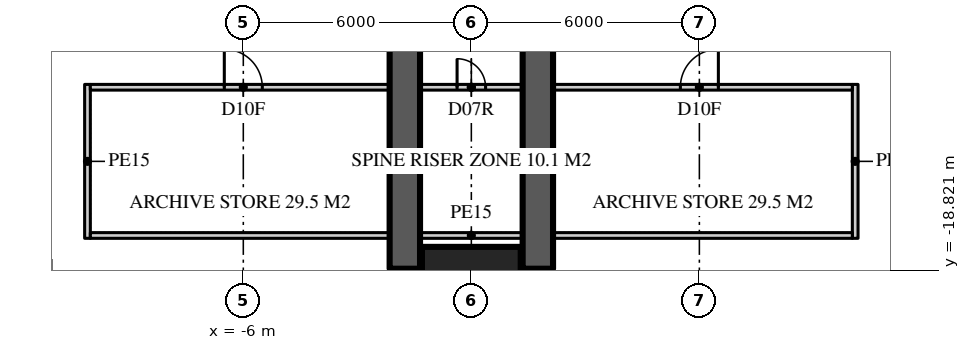
"""IFC4 building model, lengths in metres.
Left out: names, types, materials, properties, quantities, classifications, styles, units other than length and angle.
Written with IfcOpenShell. Run it as: python <this file> out.ifc"""

import sys

from ifc_helpers import new_model, si_unit, direction, frame, frame_2d, origin, origin_2d, place, context, subcontext, project, spatial, rectangle, extrude, element, fill, save


model = new_model("IFC4")
c1 = context("Model", 3, precision=1e-05, world=origin(), true_north=direction((0.0, 1.0)))
c2 = subcontext(c1, "Body", "Model", "MODEL_VIEW")
j1 = project(units=[si_unit("LENGTHUNIT", "METRE"), si_unit("PLANEANGLEUNIT", "RADIAN")], contexts=[c1])
p1 = place(None, origin())
s1 = spatial("IfcSite", under=j1, at=p1, CompositionType="ELEMENT")
p2 = place(p1, origin())
s2 = spatial("IfcBuilding", under=s1, at=p2, CompositionType="ELEMENT")
p3 = place(p2, frame((0.0, 0.0, -5.0)))
s3 = spatial("IfcBuildingStorey", under=s2, at=p3, CompositionType="ELEMENT", Elevation=-5.0)
for number, where, z_axis, x_axis in (
    (1, (-1.75, -11.15, 0.0), (0.0, 0.0, 1.0), (0.0, -1.0, 0.0)),
    (2, (1.75, -11.15, 0.0), (0.0, 0.0, 1.0), (0.0, -1.0, 0.0)),
):
    element("IfcWall", number, at=place(p3, frame(where, z_axis=z_axis, x_axis=x_axis)), inside=s3, PredefinedType="SHEAR", context=c2, shape_type="SweptSolid", body=[
        extrude(rectangle(XDim=7.625, YDim=0.8, at=frame_2d((3.812, 0.0))), origin(), (0.0, 0.0, 1.0), 5.0),
    ])
p4 = place(p3, frame((0.0, -19.5, 0.0), z_axis=(0.0, 0.0, 1.0), x_axis=(1.0, 0.0, 0.0)))
e3 = element("IfcColumn", 3, at=p4, inside=s3, PredefinedType="COLUMN", context=c2, shape_type="SweptSolid", body=[
    extrude(rectangle(XDim=2.6, YDim=2.6, at=origin_2d()), origin(), (0.0, 0.0, 1.0), 5.0),
])
for number, where, z_axis, x_axis in (
    (4, (-10.1, -13.925, 0.0), (0.0, 0.0, 1.0), (0.0, -1.0, 0.0)),
    (5, (10.1, -13.925, 0.0), (0.0, 0.0, 1.0), (0.0, -1.0, 0.0)),
):
    element("IfcWall", number, at=place(p3, frame(where, z_axis=z_axis, x_axis=x_axis)), inside=s3, PredefinedType="SOLIDWALL", context=c2, shape_type="SweptSolid", body=[
        extrude(rectangle(XDim=4.05, YDim=0.15, at=frame_2d((2.025, 0.0))), origin(), (0.0, 0.0, 1.0), 4.6),
    ])
p5 = place(p3, frame((-10.025, -17.9, 0.0), z_axis=(0.0, 0.0, 1.0), x_axis=(1.0, 0.0, 0.0)))
e6 = element("IfcWall", 6, at=p5, inside=s3, PredefinedType="SOLIDWALL", context=c2, shape_type="SweptSolid", body=[
    extrude(rectangle(XDim=20.05, YDim=0.15, at=frame_2d((10.025, 0.0))), origin(), (0.0, 0.0, 1.0), 4.6),
])
p6 = place(p3, frame((-10.025, -14.0, 0.0), z_axis=(0.0, 0.0, 1.0), x_axis=(1.0, 0.0, 0.0)))
e7 = element("IfcWall", 7, at=p6, inside=s3, PredefinedType="SOLIDWALL", context=c2, shape_type="SweptSolid", body=[
    extrude(rectangle(XDim=20.05, YDim=0.15, at=frame_2d((10.025, 0.0))), origin(), (0.0, 0.0, 1.0), 4.6),
])
p7 = place(p6, frame((9.65, 0.0, 0.0)))
e8 = element("IfcOpeningElement", 8, at=p7, cuts=e7, PredefinedType="OPENING", context=c2, shape_type="SweptSolid", body=[
    extrude(rectangle(XDim=0.75, YDim=2.1, at=frame_2d((0.375, 1.05))), frame((0.0, 0.085, 0.0), z_axis=(0.0, -1.0, 0.0), x_axis=(1.0, 0.0, 0.0)), (0.0, 0.0, 1.0), 0.17),
])
p8 = place(p6, frame((3.525, 0.0, 0.0)))
e9 = element("IfcOpeningElement", 9, at=p8, cuts=e7, PredefinedType="OPENING", context=c2, shape_type="SweptSolid", body=[
    extrude(rectangle(XDim=1.0, YDim=2.2, at=frame_2d((0.5, 1.1))), frame((0.0, 0.085, 0.0), z_axis=(0.0, -1.0, 0.0), x_axis=(1.0, 0.0, 0.0)), (0.0, 0.0, 1.0), 0.17),
])
p9 = place(p6, frame((15.525, 0.0, 0.0)))
e10 = element("IfcOpeningElement", 10, at=p9, cuts=e7, PredefinedType="OPENING", context=c2, shape_type="SweptSolid", body=[
    extrude(rectangle(XDim=1.0, YDim=2.2, at=frame_2d((0.5, 1.1))), frame((0.0, 0.085, 0.0), z_axis=(0.0, -1.0, 0.0), x_axis=(1.0, 0.0, 0.0)), (0.0, 0.0, 1.0), 0.17),
])
p10 = place(p7, origin())
e11 = element("IfcDoor", 11, at=p10, inside=s3, OperationType="SINGLE_SWING_LEFT", PredefinedType="DOOR", context=c2, shape_type="SweptSolid", body=[
    extrude(rectangle(XDim=0.75, YDim=2.1, at=frame_2d((0.375, 1.05))), frame((0.0, 0.025, 0.0), z_axis=(0.0, -1.0, 0.0), x_axis=(1.0, 0.0, 0.0)), (0.0, 0.0, 1.0), 0.05),
])
fill(e8, e11)
p11 = place(p8, origin())
e12 = element("IfcDoor", 12, at=p11, inside=s3, OperationType="SINGLE_SWING_LEFT", PredefinedType="DOOR", context=c2, shape_type="SweptSolid", body=[
    extrude(rectangle(XDim=1.0, YDim=2.2, at=frame_2d((0.5, 1.1))), frame((0.0, 0.025, 0.0), z_axis=(0.0, -1.0, 0.0), x_axis=(1.0, 0.0, 0.0)), (0.0, 0.0, 1.0), 0.05),
])
fill(e9, e12)
p12 = place(p9, origin())
e13 = element("IfcDoor", 13, at=p12, inside=s3, OperationType="SINGLE_SWING_RIGHT", PredefinedType="DOOR", context=c2, shape_type="SweptSolid", body=[
    extrude(rectangle(XDim=1.0, YDim=2.2, at=frame_2d((0.5, 1.1))), frame((0.0, 0.025, 0.0), z_axis=(0.0, -1.0, 0.0), x_axis=(1.0, 0.0, 0.0)), (0.0, 0.0, 1.0), 0.05),
])
fill(e10, e13)
save(model, sys.argv[1])
